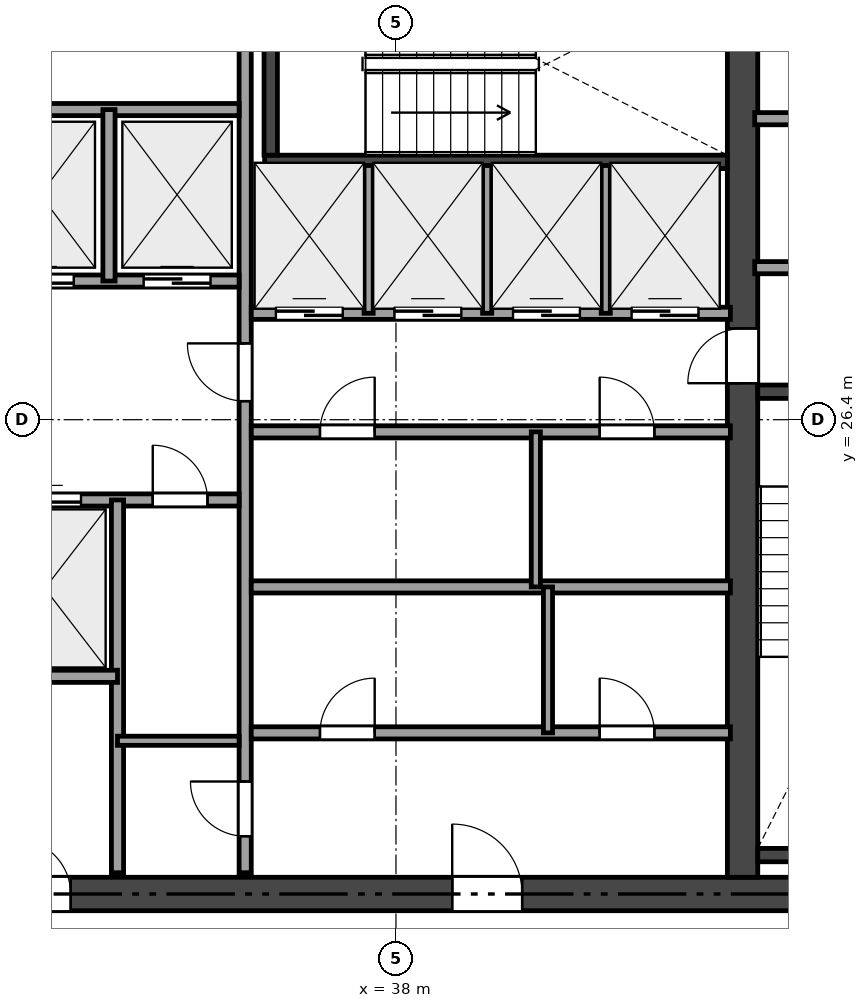
"""IFC4 building model, lengths in metres.
Left out: names, types, materials, properties, quantities, classifications, styles, units other than length and angle.
Written with IfcOpenShell. Run it as: python <this file> out.ifc"""

import sys

from ifc_helpers import new_model, si_unit, direction, frame, frame_2d, origin, place, context, subcontext, project, spatial, rectangle, extrude, element, fill, save


model = new_model("IFC4")
c1 = context("Model", 3, precision=1e-05, world=origin(), true_north=direction((0.0, 1.0)))
c2 = subcontext(c1, "Body", "Model", "MODEL_VIEW")
j1 = project(units=[si_unit("LENGTHUNIT", "METRE"), si_unit("PLANEANGLEUNIT", "RADIAN")], contexts=[c1])
p1 = place(None, origin())
s1 = spatial("IfcSite", under=j1, at=p1, CompositionType="ELEMENT")
p2 = place(p1, origin())
s2 = spatial("IfcBuilding", under=s1, at=p2, CompositionType="ELEMENT")
p3 = place(p2, frame((0.0, 0.0, 271.5)))
s3 = spatial("IfcBuildingStorey", under=s2, at=p3, CompositionType="ELEMENT", Elevation=271.5)
p4 = place(p3, frame((26.525, 18.6, 0.0), z_axis=(0.0, 0.0, 1.0), x_axis=(1.0, 0.0, 0.0)))
e1 = element("IfcWall", 1, at=p4, inside=s3, PredefinedType="SHEAR", context=c2, shape_type="SweptSolid", body=[
    extrude(rectangle(XDim=21.35, YDim=0.55, at=frame_2d((10.675, 0.0))), origin(), (0.0, 0.0, 1.0), 3.32),
])
p5 = place(p4, frame((12.4, 0.0, 0.0)))
e2 = element("IfcOpeningElement", 2, at=p5, cuts=e1, PredefinedType="OPENING", context=c2, shape_type="SweptSolid", body=[
    extrude(rectangle(XDim=1.15, YDim=2.15, at=frame_2d((0.575, 1.075))), frame((0.0, 0.285, 0.0), z_axis=(0.0, -1.0, 0.0), x_axis=(1.0, 0.0, 0.0)), (0.0, 0.0, 1.0), 0.57),
])
p6 = place(p4, frame((5.225, 0.0, 0.0)))
e3 = element("IfcOpeningElement", 3, at=p6, cuts=e1, PredefinedType="OPENING", context=c2, shape_type="SweptSolid", body=[
    extrude(rectangle(XDim=0.9, YDim=2.1, at=frame_2d((0.45, 1.05))), frame((0.0, 0.285, 0.0), z_axis=(0.0, -1.0, 0.0), x_axis=(1.0, 0.0, 0.0)), (0.0, 0.0, 1.0), 0.57),
])
p7 = place(p3, frame((43.7, 18.875, 0.0), z_axis=(0.0, 0.0, 1.0), x_axis=(0.0, 1.0, 0.0)))
e4 = element("IfcWall", 4, at=p7, inside=s3, PredefinedType="SHEAR", context=c2, shape_type="SweptSolid", body=[
    extrude(rectangle(XDim=15.05, YDim=0.5, at=frame_2d((7.525, 0.0))), origin(), (0.0, 0.0, 1.0), 3.32),
])
p8 = place(p7, frame((8.125, 0.0, 0.0)))
e5 = element("IfcOpeningElement", 5, at=p8, cuts=e4, PredefinedType="OPENING", context=c2, shape_type="SweptSolid", body=[
    extrude(rectangle(XDim=0.9, YDim=2.1, at=frame_2d((0.45, 1.05))), frame((0.0, 0.26, 0.0), z_axis=(0.0, -1.0, 0.0), x_axis=(1.0, 0.0, 0.0)), (0.0, 0.0, 1.0), 0.52),
])
for number, where, z_axis, x_axis in (
    (6, (43.95, 26.86, 0.0), (0.0, 0.0, 1.0), (1.0, 0.0, 0.0)),
    (7, (43.95, 19.24, 0.0), (0.0, 0.0, 1.0), (1.0, 0.0, 0.0)),
):
    element("IfcWall", number, at=place(p3, frame(where, z_axis=z_axis, x_axis=x_axis)), inside=s3, PredefinedType="SHEAR", context=c2, shape_type="SweptSolid", body=[
        extrude(rectangle(XDim=3.375, YDim=0.22, at=frame_2d((1.688, 0.0))), origin(), (0.0, 0.0, 1.0), 3.32),
    ])
p9 = place(p3, frame((35.84, 30.64, 0.0), z_axis=(0.0, 0.0, 1.0), x_axis=(1.0, 0.0, 0.0)))
e8 = element("IfcWall", 8, at=p9, inside=s3, PredefinedType="SHEAR", context=c2, shape_type="SweptSolid", body=[
    extrude(rectangle(XDim=7.61, YDim=0.22, at=frame_2d((3.805, 0.0))), origin(), (0.0, 0.0, 1.0), 3.32),
])
p10 = place(p3, frame((35.94, 30.75, 0.0), z_axis=(0.0, 0.0, 1.0), x_axis=(0.0, 1.0, 0.0)))
e9 = element("IfcWall", 9, at=p10, inside=s3, PredefinedType="SHEAR", context=c2, shape_type="SweptSolid", body=[
    extrude(rectangle(XDim=3.175, YDim=0.22, at=frame_2d((1.587, 0.0))), origin(), (0.0, 0.0, 1.0), 3.32),
])
p11 = place(p3, frame((43.9, 28.9, 0.0), z_axis=(0.0, 0.0, 1.0), x_axis=(1.0, 0.0, 0.0)))
e10 = element("IfcWall", 10, at=p11, inside=s3, PredefinedType="SOLIDWALL", context=c2, shape_type="SweptSolid", body=[
    extrude(rectangle(XDim=3.35, YDim=0.2, at=frame_2d((1.675, 0.0))), origin(), (0.0, 0.0, 1.0), 3.32),
])
p12 = place(p11, frame((1.15, 0.0, 0.0)))
e11 = element("IfcOpeningElement", 11, at=p12, cuts=e10, PredefinedType="OPENING", context=c2, shape_type="SweptSolid", body=[
    extrude(rectangle(XDim=0.9, YDim=2.1, at=frame_2d((0.45, 1.05))), frame((0.0, 0.11, 0.0), z_axis=(0.0, -1.0, 0.0), x_axis=(1.0, 0.0, 0.0)), (0.0, 0.0, 1.0), 0.22),
])
p13 = place(p3, frame((43.9, 31.35, 0.0), z_axis=(0.0, 0.0, 1.0), x_axis=(1.0, 0.0, 0.0)))
e12 = element("IfcWall", 12, at=p13, inside=s3, PredefinedType="SOLIDWALL", context=c2, shape_type="SweptSolid", body=[
    extrude(rectangle(XDim=3.35, YDim=0.2, at=frame_2d((1.675, 0.0))), origin(), (0.0, 0.0, 1.0), 2.993),
])
p14 = place(p3, frame((35.52, 18.95, 0.0), z_axis=(0.0, 0.0, 1.0), x_axis=(0.0, 1.0, 0.0)))
e13 = element("IfcWall", 13, at=p14, inside=s3, PredefinedType="SOLIDWALL", context=c2, shape_type="SweptSolid", body=[
    extrude(rectangle(XDim=14.9, YDim=0.2, at=frame_2d((7.45, 0.0))), origin(), (0.0, 0.0, 1.0), 2.841),
])
p15 = place(p14, frame((7.755, 0.0, 0.0)))
e14 = element("IfcOpeningElement", 14, at=p15, cuts=e13, PredefinedType="OPENING", context=c2, shape_type="SweptSolid", body=[
    extrude(rectangle(XDim=0.95, YDim=2.15, at=frame_2d((0.475, 1.075))), frame((0.0, 0.11, 0.0), z_axis=(0.0, -1.0, 0.0), x_axis=(1.0, 0.0, 0.0)), (0.0, 0.0, 1.0), 0.22),
])
p16 = place(p14, frame((0.6, 0.0, 0.0)))
e15 = element("IfcOpeningElement", 15, at=p16, cuts=e13, PredefinedType="OPENING", context=c2, shape_type="SweptSolid", body=[
    extrude(rectangle(XDim=0.9, YDim=2.1, at=frame_2d((0.45, 1.05))), frame((0.0, 0.11, 0.0), z_axis=(0.0, -1.0, 0.0), x_axis=(1.0, 0.0, 0.0)), (0.0, 0.0, 1.0), 0.22),
])
p17 = place(p3, frame((31.0, 28.68, 0.0), z_axis=(0.0, 0.0, 1.0), x_axis=(1.0, 0.0, 0.0)))
e16 = element("IfcWall", 16, at=p17, inside=s3, PredefinedType="SOLIDWALL", context=c2, shape_type="SweptSolid", body=[
    extrude(rectangle(XDim=4.42, YDim=0.2, at=frame_2d((2.21, 0.0))), origin(), (0.0, 0.0, 1.0), 3.32),
])
p18 = place(p17, frame((0.6, 0.0, 0.0)))
e17 = element("IfcOpeningElement", 17, at=p18, cuts=e16, PredefinedType="OPENING", context=c2, shape_type="SweptSolid", body=[
    extrude(rectangle(XDim=1.1, YDim=2.15, at=frame_2d((0.55, 1.075))), frame((0.0, 0.11, 0.0), z_axis=(0.0, -1.0, 0.0), x_axis=(1.0, 0.0, 0.0)), (0.0, 0.0, 1.0), 0.22),
])
p19 = place(p17, frame((2.85, 0.0, 0.0)))
e18 = element("IfcOpeningElement", 18, at=p19, cuts=e16, PredefinedType="OPENING", context=c2, shape_type="SweptSolid", body=[
    extrude(rectangle(XDim=1.1, YDim=2.15, at=frame_2d((0.55, 1.075))), frame((0.0, 0.11, 0.0), z_axis=(0.0, -1.0, 0.0), x_axis=(1.0, 0.0, 0.0)), (0.0, 0.0, 1.0), 0.22),
])
p20 = place(p3, frame((31.0, 31.5, 0.0), z_axis=(0.0, 0.0, 1.0), x_axis=(1.0, 0.0, 0.0)))
e19 = element("IfcWall", 19, at=p20, inside=s3, PredefinedType="SOLIDWALL", context=c2, shape_type="SweptSolid", body=[
    extrude(rectangle(XDim=4.42, YDim=0.2, at=frame_2d((2.21, 0.0))), origin(), (0.0, 0.0, 1.0), 3.32),
])
p21 = place(p3, frame((33.28, 28.68, 0.0), z_axis=(0.0, 0.0, 1.0), x_axis=(0.0, 1.0, 0.0)))
e20 = element("IfcWall", 20, at=p21, inside=s3, PredefinedType="SOLIDWALL", context=c2, shape_type="SweptSolid", body=[
    extrude(rectangle(XDim=2.82, YDim=0.2, at=frame_2d((1.41, 0.0))), origin(), (0.0, 0.0, 1.0), 3.32),
])
p22 = place(p3, frame((31.0, 25.08, 0.0), z_axis=(0.0, 0.0, 1.0), x_axis=(1.0, 0.0, 0.0)))
e21 = element("IfcWall", 21, at=p22, inside=s3, PredefinedType="SOLIDWALL", context=c2, shape_type="SweptSolid", body=[
    extrude(rectangle(XDim=4.42, YDim=0.2, at=frame_2d((2.21, 0.0))), origin(), (0.0, 0.0, 1.0), 3.32),
])
p23 = place(p22, frame((3.0, 0.0, 0.0)))
e22 = element("IfcOpeningElement", 22, at=p23, cuts=e21, PredefinedType="OPENING", context=c2, shape_type="SweptSolid", body=[
    extrude(rectangle(XDim=0.9, YDim=2.1, at=frame_2d((0.45, 1.05))), frame((0.0, 0.11, 0.0), z_axis=(0.0, -1.0, 0.0), x_axis=(1.0, 0.0, 0.0)), (0.0, 0.0, 1.0), 0.22),
])
p24 = place(p22, frame((0.62, 0.0, 0.0)))
e23 = element("IfcOpeningElement", 23, at=p24, cuts=e21, PredefinedType="OPENING", context=c2, shape_type="SweptSolid", body=[
    extrude(rectangle(XDim=1.2, YDim=2.15, at=frame_2d((0.6, 1.075))), frame((0.0, 0.11, 0.0), z_axis=(0.0, -1.0, 0.0), x_axis=(1.0, 0.0, 0.0)), (0.0, 0.0, 1.0), 0.22),
])
p25 = place(p3, frame((33.42, 18.95, 0.0), z_axis=(0.0, 0.0, 1.0), x_axis=(0.0, 1.0, 0.0)))
e24 = element("IfcWall", 24, at=p25, inside=s3, PredefinedType="SOLIDWALL", context=c2, shape_type="SweptSolid", body=[
    extrude(rectangle(XDim=6.13, YDim=0.2, at=frame_2d((3.065, 0.0))), origin(), (0.0, 0.0, 1.0), 2.841),
])
p26 = place(p3, frame((31.0, 22.18, 0.0), z_axis=(0.0, 0.0, 1.0), x_axis=(1.0, 0.0, 0.0)))
e25 = element("IfcWall", 25, at=p26, inside=s3, PredefinedType="SOLIDWALL", context=c2, shape_type="SweptSolid", body=[
    extrude(rectangle(XDim=2.42, YDim=0.2, at=frame_2d((1.21, 0.0))), origin(), (0.0, 0.0, 1.0), 3.32),
])
p27 = place(p3, frame((33.42, 21.12, 0.0), z_axis=(0.0, 0.0, 1.0), x_axis=(1.0, 0.0, 0.0)))
e26 = element("IfcWall", 26, at=p27, inside=s3, PredefinedType="PARTITIONING", context=c2, shape_type="SweptSolid", body=[
    extrude(rectangle(XDim=2.0, YDim=0.15, at=frame_2d((1.0, 0.0))), origin(), (0.0, 0.0, 1.0), 3.32),
])
p28 = place(p3, frame((35.62, 28.15, 0.0), z_axis=(0.0, 0.0, 1.0), x_axis=(1.0, 0.0, 0.0)))
e27 = element("IfcWall", 27, at=p28, inside=s3, PredefinedType="SOLIDWALL", context=c2, shape_type="SweptSolid", body=[
    extrude(rectangle(XDim=7.88, YDim=0.2, at=frame_2d((3.94, 0.0))), origin(), (0.0, 0.0, 1.0), 3.32),
])
p29 = place(p28, frame((0.405, 0.0, 0.0)))
e28 = element("IfcOpeningElement", 28, at=p29, cuts=e27, PredefinedType="OPENING", context=c2, shape_type="SweptSolid", body=[
    extrude(rectangle(XDim=1.1, YDim=2.15, at=frame_2d((0.55, 1.075))), frame((0.0, 0.11, 0.0), z_axis=(0.0, -1.0, 0.0), x_axis=(1.0, 0.0, 0.0)), (0.0, 0.0, 1.0), 0.22),
])
p30 = place(p28, frame((2.355, 0.0, 0.0)))
e29 = element("IfcOpeningElement", 29, at=p30, cuts=e27, PredefinedType="OPENING", context=c2, shape_type="SweptSolid", body=[
    extrude(rectangle(XDim=1.1, YDim=2.15, at=frame_2d((0.55, 1.075))), frame((0.0, 0.11, 0.0), z_axis=(0.0, -1.0, 0.0), x_axis=(1.0, 0.0, 0.0)), (0.0, 0.0, 1.0), 0.22),
])
p31 = place(p28, frame((4.305, 0.0, 0.0)))
e30 = element("IfcOpeningElement", 30, at=p31, cuts=e27, PredefinedType="OPENING", context=c2, shape_type="SweptSolid", body=[
    extrude(rectangle(XDim=1.1, YDim=2.15, at=frame_2d((0.55, 1.075))), frame((0.0, 0.11, 0.0), z_axis=(0.0, -1.0, 0.0), x_axis=(1.0, 0.0, 0.0)), (0.0, 0.0, 1.0), 0.22),
])
p32 = place(p28, frame((6.255, 0.0, 0.0)))
e31 = element("IfcOpeningElement", 31, at=p32, cuts=e27, PredefinedType="OPENING", context=c2, shape_type="SweptSolid", body=[
    extrude(rectangle(XDim=1.1, YDim=2.15, at=frame_2d((0.55, 1.075))), frame((0.0, 0.11, 0.0), z_axis=(0.0, -1.0, 0.0), x_axis=(1.0, 0.0, 0.0)), (0.0, 0.0, 1.0), 0.22),
])
p33 = place(p3, frame((35.62, 26.2, 0.0), z_axis=(0.0, 0.0, 1.0), x_axis=(1.0, 0.0, 0.0)))
e32 = element("IfcWall", 32, at=p33, inside=s3, PredefinedType="SOLIDWALL", context=c2, shape_type="SweptSolid", body=[
    extrude(rectangle(XDim=7.88, YDim=0.2, at=frame_2d((3.94, 0.0))), origin(), (0.0, 0.0, 1.0), 3.32),
])
p34 = place(p33, frame((1.13, 0.0, 0.0)))
e33 = element("IfcOpeningElement", 33, at=p34, cuts=e32, PredefinedType="OPENING", context=c2, shape_type="SweptSolid", body=[
    extrude(rectangle(XDim=0.9, YDim=2.1, at=frame_2d((0.45, 1.05))), frame((0.0, 0.11, 0.0), z_axis=(0.0, -1.0, 0.0), x_axis=(1.0, 0.0, 0.0)), (0.0, 0.0, 1.0), 0.22),
])
p35 = place(p33, frame((5.73, 0.0, 0.0)))
e34 = element("IfcOpeningElement", 34, at=p35, cuts=e32, PredefinedType="OPENING", context=c2, shape_type="SweptSolid", body=[
    extrude(rectangle(XDim=0.9, YDim=2.1, at=frame_2d((0.45, 1.05))), frame((0.0, 0.11, 0.0), z_axis=(0.0, -1.0, 0.0), x_axis=(1.0, 0.0, 0.0)), (0.0, 0.0, 1.0), 0.22),
])
p36 = place(p3, frame((35.62, 23.65, 0.0), z_axis=(0.0, 0.0, 1.0), x_axis=(1.0, 0.0, 0.0)))
e35 = element("IfcWall", 35, at=p36, inside=s3, PredefinedType="SOLIDWALL", context=c2, shape_type="SweptSolid", body=[
    extrude(rectangle(XDim=7.88, YDim=0.2, at=frame_2d((3.94, 0.0))), origin(), (0.0, 0.0, 1.0), 2.841),
])
p37 = place(p3, frame((35.62, 21.25, 0.0), z_axis=(0.0, 0.0, 1.0), x_axis=(1.0, 0.0, 0.0)))
e36 = element("IfcWall", 36, at=p37, inside=s3, PredefinedType="SOLIDWALL", context=c2, shape_type="SweptSolid", body=[
    extrude(rectangle(XDim=7.88, YDim=0.2, at=frame_2d((3.94, 0.0))), origin(), (0.0, 0.0, 1.0), 3.32),
])
p38 = place(p37, frame((1.13, 0.0, 0.0)))
e37 = element("IfcOpeningElement", 37, at=p38, cuts=e36, PredefinedType="OPENING", context=c2, shape_type="SweptSolid", body=[
    extrude(rectangle(XDim=0.9, YDim=2.1, at=frame_2d((0.45, 1.05))), frame((0.0, 0.11, 0.0), z_axis=(0.0, -1.0, 0.0), x_axis=(1.0, 0.0, 0.0)), (0.0, 0.0, 1.0), 0.22),
])
p39 = place(p37, frame((5.73, 0.0, 0.0)))
e38 = element("IfcOpeningElement", 38, at=p39, cuts=e36, PredefinedType="OPENING", context=c2, shape_type="SweptSolid", body=[
    extrude(rectangle(XDim=0.9, YDim=2.1, at=frame_2d((0.45, 1.05))), frame((0.0, 0.11, 0.0), z_axis=(0.0, -1.0, 0.0), x_axis=(1.0, 0.0, 0.0)), (0.0, 0.0, 1.0), 0.22),
])
for number, where, z_axis, x_axis in (
    (39, (37.55, 28.15, 0.0), (0.0, 0.0, 1.0), (0.0, 1.0, 0.0)),
    (40, (39.5, 28.15, 0.0), (0.0, 0.0, 1.0), (0.0, 1.0, 0.0)),
    (41, (41.45, 28.15, 0.0), (0.0, 0.0, 1.0), (0.0, 1.0, 0.0)),
):
    element("IfcWall", number, at=place(p3, frame(where, z_axis=z_axis, x_axis=x_axis)), inside=s3, PredefinedType="PARTITIONING", context=c2, shape_type="SweptSolid", body=[
        extrude(rectangle(XDim=2.43, YDim=0.15, at=frame_2d((1.215, 0.0))), origin(), (0.0, 0.0, 1.0), 3.32),
    ])
p40 = place(p3, frame((40.3, 23.65, 0.0), z_axis=(0.0, 0.0, 1.0), x_axis=(0.0, 1.0, 0.0)))
e42 = element("IfcWall", 42, at=p40, inside=s3, PredefinedType="PARTITIONING", context=c2, shape_type="SweptSolid", body=[
    extrude(rectangle(XDim=2.55, YDim=0.15, at=frame_2d((1.275, 0.0))), origin(), (0.0, 0.0, 1.0), 2.841),
])
p41 = place(p3, frame((40.5, 21.25, 0.0), z_axis=(0.0, 0.0, 1.0), x_axis=(0.0, 1.0, 0.0)))
e43 = element("IfcWall", 43, at=p41, inside=s3, PredefinedType="PARTITIONING", context=c2, shape_type="SweptSolid", body=[
    extrude(rectangle(XDim=2.4, YDim=0.15, at=frame_2d((1.2, 0.0))), origin(), (0.0, 0.0, 1.0), 2.841),
])
p42 = place(p15, origin())
e44 = element("IfcDoor", 44, at=p42, inside=s3, OperationType="SINGLE_SWING_RIGHT", PredefinedType="DOOR", context=c2, shape_type="SweptSolid", body=[
    extrude(rectangle(XDim=0.95, YDim=2.15, at=frame_2d((0.475, 1.075))), frame((0.0, 0.025, 0.0), z_axis=(0.0, -1.0, 0.0), x_axis=(1.0, 0.0, 0.0)), (0.0, 0.0, 1.0), 0.05),
])
fill(e14, e44)
p43 = place(p8, origin())
e45 = element("IfcDoor", 45, at=p43, inside=s3, OperationType="SINGLE_SWING_LEFT", PredefinedType="DOOR", context=c2, shape_type="SweptSolid", body=[
    extrude(rectangle(XDim=0.9, YDim=2.1, at=frame_2d((0.45, 1.05))), frame((0.0, 0.025, 0.0), z_axis=(0.0, -1.0, 0.0), x_axis=(1.0, 0.0, 0.0)), (0.0, 0.0, 1.0), 0.05),
])
fill(e5, e45)
p44 = place(p5, origin())
e46 = element("IfcDoor", 46, at=p44, inside=s3, OperationType="SINGLE_SWING_LEFT", PredefinedType="DOOR", context=c2, shape_type="SweptSolid", body=[
    extrude(rectangle(XDim=1.15, YDim=2.15, at=frame_2d((0.575, 1.075))), frame((0.0, 0.025, 0.0), z_axis=(0.0, -1.0, 0.0), x_axis=(1.0, 0.0, 0.0)), (0.0, 0.0, 1.0), 0.05),
])
fill(e2, e46)
p45 = place(p6, origin())
e47 = element("IfcDoor", 47, at=p45, inside=s3, OperationType="SINGLE_SWING_LEFT", PredefinedType="DOOR", context=c2, shape_type="SweptSolid", body=[
    extrude(rectangle(XDim=0.9, YDim=2.1, at=frame_2d((0.45, 1.05))), frame((0.0, 0.025, 0.0), z_axis=(0.0, -1.0, 0.0), x_axis=(1.0, 0.0, 0.0)), (0.0, 0.0, 1.0), 0.05),
])
fill(e3, e47)
p46 = place(p16, origin())
e48 = element("IfcDoor", 48, at=p46, inside=s3, OperationType="SINGLE_SWING_RIGHT", PredefinedType="DOOR", context=c2, shape_type="SweptSolid", body=[
    extrude(rectangle(XDim=0.9, YDim=2.1, at=frame_2d((0.45, 1.05))), frame((0.0, 0.025, 0.0), z_axis=(0.0, -1.0, 0.0), x_axis=(1.0, 0.0, 0.0)), (0.0, 0.0, 1.0), 0.05),
])
fill(e15, e48)
p47 = place(p23, origin())
e49 = element("IfcDoor", 49, at=p47, inside=s3, OperationType="SINGLE_SWING_LEFT", PredefinedType="DOOR", context=c2, shape_type="SweptSolid", body=[
    extrude(rectangle(XDim=0.9, YDim=2.1, at=frame_2d((0.45, 1.05))), frame((0.0, 0.025, 0.0), z_axis=(0.0, -1.0, 0.0), x_axis=(1.0, 0.0, 0.0)), (0.0, 0.0, 1.0), 0.05),
])
fill(e22, e49)
p48 = place(p38, origin())
e50 = element("IfcDoor", 50, at=p48, inside=s3, OperationType="SINGLE_SWING_RIGHT", PredefinedType="DOOR", context=c2, shape_type="SweptSolid", body=[
    extrude(rectangle(XDim=0.9, YDim=2.1, at=frame_2d((0.45, 1.05))), frame((0.0, 0.025, 0.0), z_axis=(0.0, -1.0, 0.0), x_axis=(1.0, 0.0, 0.0)), (0.0, 0.0, 1.0), 0.05),
])
fill(e37, e50)
p49 = place(p39, origin())
e51 = element("IfcDoor", 51, at=p49, inside=s3, OperationType="SINGLE_SWING_LEFT", PredefinedType="DOOR", context=c2, shape_type="SweptSolid", body=[
    extrude(rectangle(XDim=0.9, YDim=2.1, at=frame_2d((0.45, 1.05))), frame((0.0, 0.025, 0.0), z_axis=(0.0, -1.0, 0.0), x_axis=(1.0, 0.0, 0.0)), (0.0, 0.0, 1.0), 0.05),
])
fill(e38, e51)
p50 = place(p34, origin())
e52 = element("IfcDoor", 52, at=p50, inside=s3, OperationType="SINGLE_SWING_RIGHT", PredefinedType="DOOR", context=c2, shape_type="SweptSolid", body=[
    extrude(rectangle(XDim=0.9, YDim=2.1, at=frame_2d((0.45, 1.05))), frame((0.0, 0.025, 0.0), z_axis=(0.0, -1.0, 0.0), x_axis=(1.0, 0.0, 0.0)), (0.0, 0.0, 1.0), 0.05),
])
fill(e33, e52)
p51 = place(p35, origin())
e53 = element("IfcDoor", 53, at=p51, inside=s3, OperationType="SINGLE_SWING_LEFT", PredefinedType="DOOR", context=c2, shape_type="SweptSolid", body=[
    extrude(rectangle(XDim=0.9, YDim=2.1, at=frame_2d((0.45, 1.05))), frame((0.0, 0.025, 0.0), z_axis=(0.0, -1.0, 0.0), x_axis=(1.0, 0.0, 0.0)), (0.0, 0.0, 1.0), 0.05),
])
fill(e34, e53)
p52 = place(p18, origin())
e54 = element("IfcDoor", 54, at=p52, inside=s3, OperationType="SLIDING_TO_LEFT", PredefinedType="DOOR", context=c2, shape_type="SweptSolid", body=[
    extrude(rectangle(XDim=1.1, YDim=2.15, at=frame_2d((0.55, 1.075))), frame((0.0, 0.025, 0.0), z_axis=(0.0, -1.0, 0.0), x_axis=(1.0, 0.0, 0.0)), (0.0, 0.0, 1.0), 0.05),
])
fill(e17, e54)
p53 = place(p19, origin())
e55 = element("IfcDoor", 55, at=p53, inside=s3, OperationType="SLIDING_TO_LEFT", PredefinedType="DOOR", context=c2, shape_type="SweptSolid", body=[
    extrude(rectangle(XDim=1.1, YDim=2.15, at=frame_2d((0.55, 1.075))), frame((0.0, 0.025, 0.0), z_axis=(0.0, -1.0, 0.0), x_axis=(1.0, 0.0, 0.0)), (0.0, 0.0, 1.0), 0.05),
])
fill(e18, e55)
p54 = place(p24, origin())
e56 = element("IfcDoor", 56, at=p54, inside=s3, OperationType="SLIDING_TO_LEFT", PredefinedType="DOOR", context=c2, shape_type="SweptSolid", body=[
    extrude(rectangle(XDim=1.2, YDim=2.15, at=frame_2d((0.6, 1.075))), frame((0.0, 0.025, 0.0), z_axis=(0.0, -1.0, 0.0), x_axis=(1.0, 0.0, 0.0)), (0.0, 0.0, 1.0), 0.05),
])
fill(e23, e56)
p55 = place(p29, origin())
e57 = element("IfcDoor", 57, at=p55, inside=s3, OperationType="SLIDING_TO_LEFT", PredefinedType="DOOR", context=c2, shape_type="SweptSolid", body=[
    extrude(rectangle(XDim=1.1, YDim=2.15, at=frame_2d((0.55, 1.075))), frame((0.0, 0.025, 0.0), z_axis=(0.0, -1.0, 0.0), x_axis=(1.0, 0.0, 0.0)), (0.0, 0.0, 1.0), 0.05),
])
fill(e28, e57)
p56 = place(p30, origin())
e58 = element("IfcDoor", 58, at=p56, inside=s3, OperationType="SLIDING_TO_LEFT", PredefinedType="DOOR", context=c2, shape_type="SweptSolid", body=[
    extrude(rectangle(XDim=1.1, YDim=2.15, at=frame_2d((0.55, 1.075))), frame((0.0, 0.025, 0.0), z_axis=(0.0, -1.0, 0.0), x_axis=(1.0, 0.0, 0.0)), (0.0, 0.0, 1.0), 0.05),
])
fill(e29, e58)
p57 = place(p31, origin())
e59 = element("IfcDoor", 59, at=p57, inside=s3, OperationType="SLIDING_TO_LEFT", PredefinedType="DOOR", context=c2, shape_type="SweptSolid", body=[
    extrude(rectangle(XDim=1.1, YDim=2.15, at=frame_2d((0.55, 1.075))), frame((0.0, 0.025, 0.0), z_axis=(0.0, -1.0, 0.0), x_axis=(1.0, 0.0, 0.0)), (0.0, 0.0, 1.0), 0.05),
])
fill(e30, e59)
p58 = place(p32, origin())
e60 = element("IfcDoor", 60, at=p58, inside=s3, OperationType="SLIDING_TO_LEFT", PredefinedType="DOOR", context=c2, shape_type="SweptSolid", body=[
    extrude(rectangle(XDim=1.1, YDim=2.15, at=frame_2d((0.55, 1.075))), frame((0.0, 0.025, 0.0), z_axis=(0.0, -1.0, 0.0), x_axis=(1.0, 0.0, 0.0)), (0.0, 0.0, 1.0), 0.05),
])
fill(e31, e60)
save(model, sys.argv[1])
